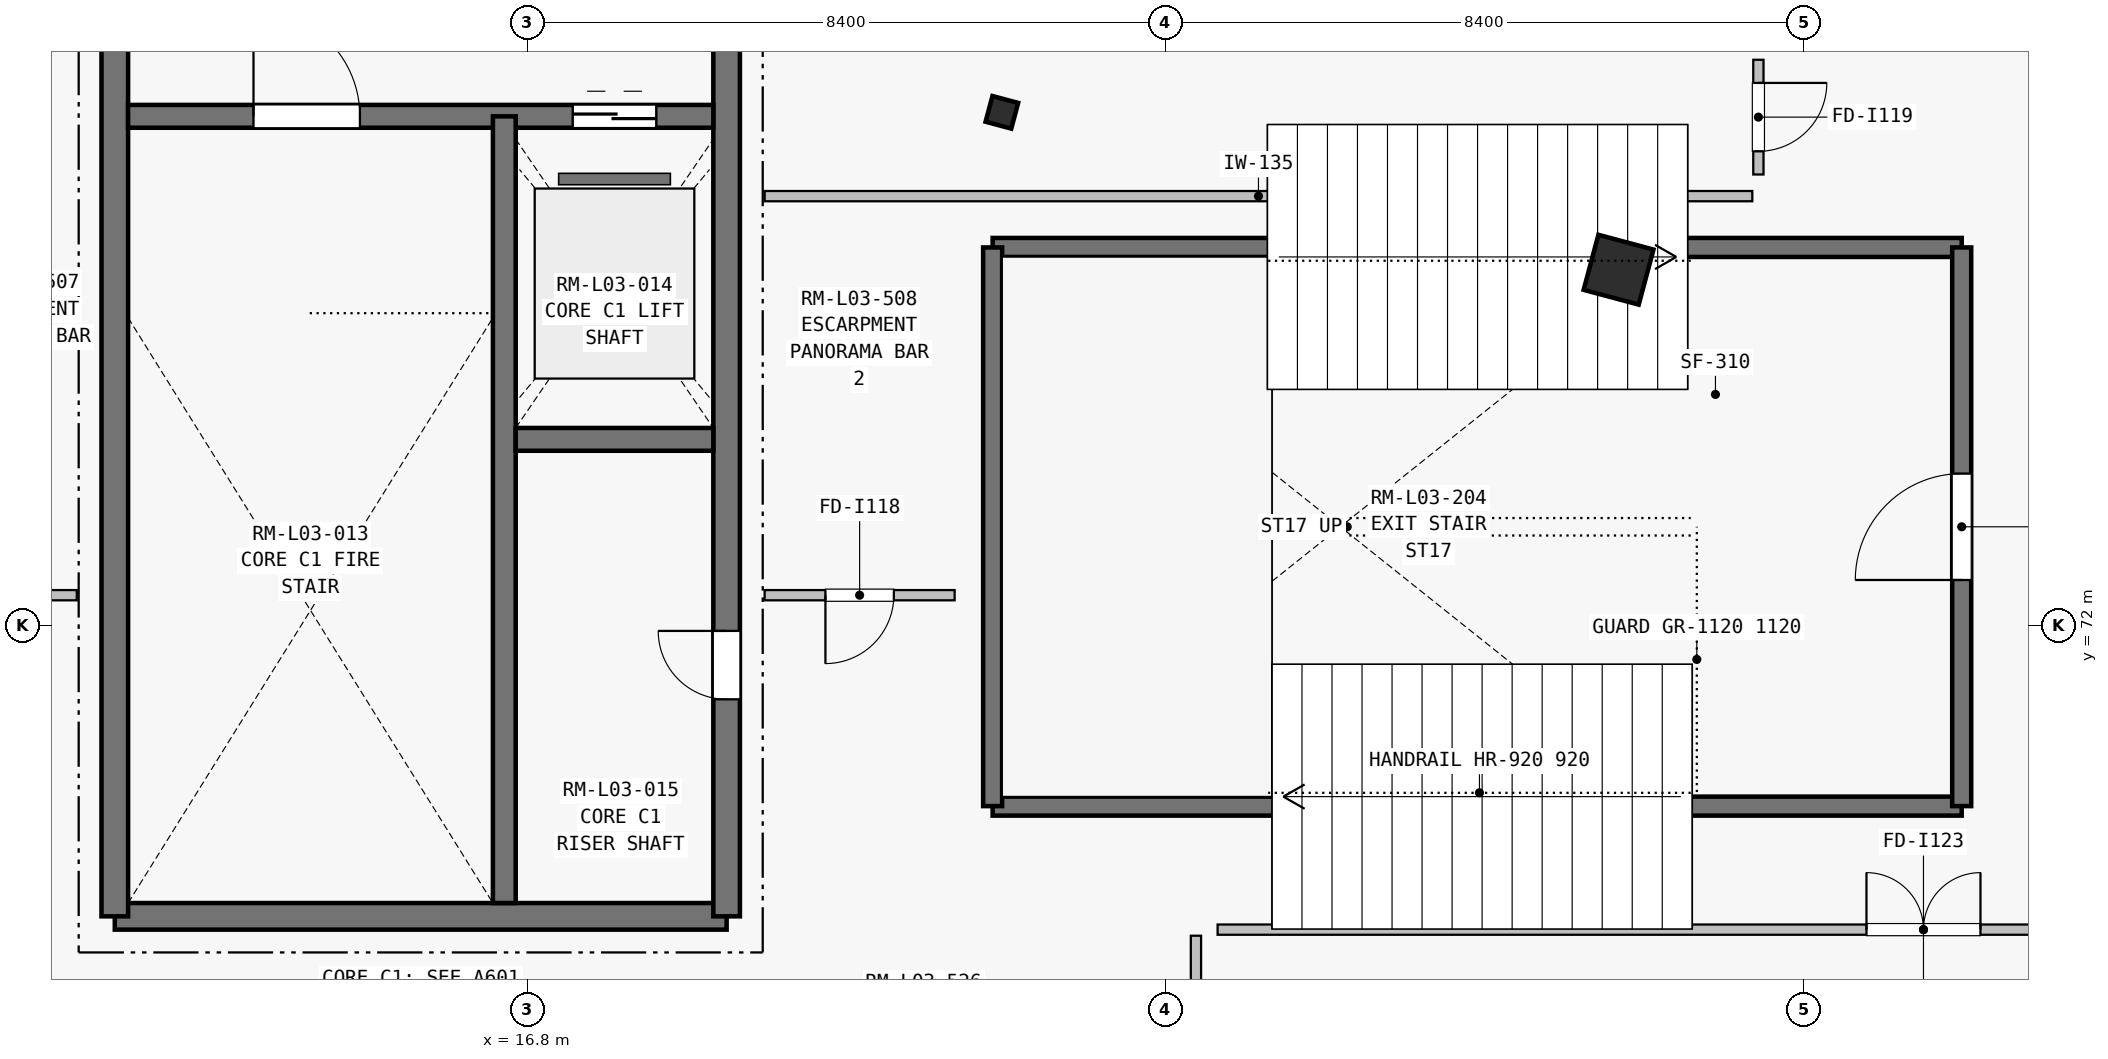
"""IFC4 building model, lengths in metres.
Left out: names, types, materials, properties, quantities, classifications, styles, units other than length and angle.
Written with IfcOpenShell. Run it as: python <this file> out.ifc"""

import sys

from ifc_helpers import new_model, si_unit, direction, frame, frame_2d, origin, origin_2d, place, context, subcontext, project, spatial, rectangle, i_section, extrude, element, fill, save


model = new_model("IFC4")
c1 = context("Model", 3, precision=1e-05, world=origin(), true_north=direction((0.0, 1.0)))
c2 = subcontext(c1, "Body", "Model", "MODEL_VIEW")
j1 = project(units=[si_unit("LENGTHUNIT", "METRE"), si_unit("PLANEANGLEUNIT", "RADIAN")], contexts=[c1])
p1 = place(None, origin())
s1 = spatial("IfcSite", under=j1, at=p1, CompositionType="ELEMENT")
p2 = place(p1, origin())
s2 = spatial("IfcBuilding", under=s1, at=p2, CompositionType="ELEMENT")
p3 = place(p2, frame((0.0, 0.0, 14.4)))
s3 = spatial("IfcBuildingStorey", under=s2, at=p3, CompositionType="ELEMENT", Elevation=14.4)
p4 = place(p3, frame((31.16, 76.682, 0.0), z_axis=(0.0, 0.0, 1.0), x_axis=(-0.965925826289, 0.258819045103, 0.0)))
e1 = element("IfcColumn", 1, at=p4, inside=s3, PredefinedType="COLUMN", context=c2, shape_type="SweptSolid", body=[
    extrude(rectangle(XDim=0.75, YDim=0.75, at=origin_2d()), origin(), (0.0, 0.0, 1.0), 4.5),
])
p5 = place(p3, frame((23.046, 78.753, 0.0), z_axis=(0.0, 0.0, 1.0), x_axis=(-0.965925826289, 0.258819045103, 0.0)))
e2 = element("IfcColumn", 2, at=p5, inside=s3, PredefinedType="COLUMN", context=c2, shape_type="SweptSolid", body=[
    extrude(i_section(OverallWidth=0.35, OverallDepth=0.35, WebThickness=0.014, FlangeThickness=0.024, at=origin_2d()), origin(), (0.0, 0.0, 1.0), 4.5),
])
p6 = place(p3, frame((11.375, 68.175, 0.0), z_axis=(0.0, 0.0, 1.0), x_axis=(1.0, 0.0, 0.0)))
e3 = element("IfcWall", 3, at=p6, inside=s3, PredefinedType="SHEAR", context=c2, shape_type="SweptSolid", body=[
    extrude(rectangle(XDim=8.05, YDim=0.35, at=frame_2d((4.025, 0.0))), origin(), (0.0, 0.0, 1.0), 4.5),
])
p7 = place(p3, frame((11.375, 68.175, 0.0), z_axis=(0.0, 0.0, 1.0), x_axis=(0.0, 1.0, 0.0)))
e4 = element("IfcWall", 4, at=p7, inside=s3, PredefinedType="SHEAR", context=c2, shape_type="SweptSolid", body=[
    extrude(rectangle(XDim=14.85, YDim=0.35, at=frame_2d((7.425, 0.0))), origin(), (0.0, 0.0, 1.0), 4.5),
])
p8 = place(p3, frame((19.425, 68.175, 0.0), z_axis=(0.0, 0.0, 1.0), x_axis=(0.0, 1.0, 0.0)))
e5 = element("IfcWall", 5, at=p8, inside=s3, PredefinedType="SHEAR", context=c2, shape_type="SweptSolid", body=[
    extrude(rectangle(XDim=14.85, YDim=0.35, at=frame_2d((7.425, 0.0))), origin(), (0.0, 0.0, 1.0), 4.5),
])
p9 = place(p8, frame((2.855, 0.0, 0.0)))
e6 = element("IfcOpeningElement", 6, at=p9, cuts=e5, PredefinedType="OPENING", context=c2, shape_type="SweptSolid", body=[
    extrude(rectangle(XDim=0.9, YDim=2.1, at=frame_2d((0.45, 1.05))), frame((0.0, 0.185, 0.0), z_axis=(0.0, -1.0, 0.0), x_axis=(1.0, 0.0, 0.0)), (0.0, 0.0, 1.0), 0.37),
])
p10 = place(p3, frame((11.55, 78.7, 0.0), z_axis=(0.0, 0.0, 1.0), x_axis=(1.0, 0.0, 0.0)))
e7 = element("IfcWall", 7, at=p10, inside=s3, PredefinedType="SHEAR", context=c2, shape_type="SweptSolid", body=[
    extrude(rectangle(XDim=7.7, YDim=0.3, at=frame_2d((3.85, 0.0))), origin(), (0.0, 0.0, 1.0), 4.5),
])
p11 = place(p10, frame((1.65, 0.0, 0.0)))
e8 = element("IfcOpeningElement", 8, at=p11, cuts=e7, PredefinedType="OPENING", context=c2, shape_type="SweptSolid", body=[
    extrude(rectangle(XDim=1.4, YDim=2.2, at=frame_2d((0.7, 1.1))), frame((0.0, 0.16, 0.0), z_axis=(0.0, -1.0, 0.0), x_axis=(1.0, 0.0, 0.0)), (0.0, 0.0, 1.0), 0.32),
])
p12 = place(p10, frame((5.85, 0.0, 0.0)))
e9 = element("IfcOpeningElement", 9, at=p12, cuts=e7, PredefinedType="OPENING", context=c2, shape_type="SweptSolid", body=[
    extrude(rectangle(XDim=1.1, YDim=2.2, at=frame_2d((0.55, 1.1))), frame((0.0, 0.16, 0.0), z_axis=(0.0, -1.0, 0.0), x_axis=(1.0, 0.0, 0.0)), (0.0, 0.0, 1.0), 0.32),
])
p13 = place(p3, frame((16.5, 68.35, 0.0), z_axis=(0.0, 0.0, 1.0), x_axis=(0.0, 1.0, 0.0)))
e10 = element("IfcWall", 10, at=p13, inside=s3, PredefinedType="SHEAR", context=c2, shape_type="SweptSolid", body=[
    extrude(rectangle(XDim=10.35, YDim=0.3, at=frame_2d((5.175, 0.0))), origin(), (0.0, 0.0, 1.0), 4.5),
])
p14 = place(p3, frame((16.65, 74.45, 0.0), z_axis=(0.0, 0.0, 1.0), x_axis=(1.0, 0.0, 0.0)))
e11 = element("IfcWall", 11, at=p14, inside=s3, PredefinedType="SHEAR", context=c2, shape_type="SweptSolid", body=[
    extrude(rectangle(XDim=2.6, YDim=0.3, at=frame_2d((1.3, 0.0))), origin(), (0.0, 0.0, 1.0), 4.5),
])
for number, where, z_axis, x_axis in (
    (12, (22.925, 69.625, 0.0), (0.0, 0.0, 1.0), (1.0, 0.0, 0.0)),
    (13, (22.925, 76.975, 0.0), (0.0, 0.0, 1.0), (1.0, 0.0, 0.0)),
):
    element("IfcWall", number, at=place(p3, frame(where, z_axis=z_axis, x_axis=x_axis)), inside=s3, PredefinedType="SHEAR", context=c2, shape_type="SweptSolid", body=[
        extrude(rectangle(XDim=12.75, YDim=0.25, at=frame_2d((6.375, 0.0))), origin(), (0.0, 0.0, 1.0), 4.5),
    ])
p15 = place(p3, frame((22.925, 69.625, 0.0), z_axis=(0.0, 0.0, 1.0), x_axis=(0.0, 1.0, 0.0)))
e14 = element("IfcWall", 14, at=p15, inside=s3, PredefinedType="SHEAR", context=c2, shape_type="SweptSolid", body=[
    extrude(rectangle(XDim=7.35, YDim=0.25, at=frame_2d((3.675, 0.0))), origin(), (0.0, 0.0, 1.0), 4.5),
])
p16 = place(p3, frame((35.675, 69.625, 0.0), z_axis=(0.0, 0.0, 1.0), x_axis=(0.0, 1.0, 0.0)))
e15 = element("IfcWall", 15, at=p16, inside=s3, PredefinedType="SHEAR", context=c2, shape_type="SweptSolid", body=[
    extrude(rectangle(XDim=7.35, YDim=0.25, at=frame_2d((3.675, 0.0))), origin(), (0.0, 0.0, 1.0), 4.5),
])
p17 = place(p16, frame((2.975, 0.0, 0.0)))
e16 = element("IfcOpeningElement", 16, at=p17, cuts=e15, PredefinedType="OPENING", context=c2, shape_type="SweptSolid", body=[
    extrude(rectangle(XDim=1.4, YDim=2.2, at=frame_2d((0.7, 1.1))), frame((0.0, 0.135, 0.0), z_axis=(0.0, -1.0, 0.0), x_axis=(1.0, 0.0, 0.0)), (0.0, 0.0, 1.0), 0.27),
])
p18 = place(p3, frame((10.875, 72.4, 0.0), z_axis=(0.0, 0.0, 1.0), x_axis=(-1.0, 0.0, 0.0)))
e17 = element("IfcWall", 17, at=p18, inside=s3, PredefinedType="PARTITIONING", context=c2, shape_type="SweptSolid", body=[
    extrude(rectangle(XDim=1.8, YDim=0.135, at=frame_2d((0.9, 0.0))), origin(), (0.0, 0.0, 1.0), 4.26),
])
p19 = place(p18, frame((0.45, 0.0, 0.0)))
e18 = element("IfcOpeningElement", 18, at=p19, cuts=e17, PredefinedType="OPENING", context=c2, shape_type="SweptSolid", body=[
    extrude(rectangle(XDim=0.9, YDim=2.1, at=frame_2d((0.45, 1.05))), frame((0.0, 0.077, 0.0), z_axis=(0.0, -1.0, 0.0), x_axis=(1.0, 0.0, 0.0)), (0.0, 0.0, 1.0), 0.155),
])
p20 = place(p3, frame((22.425, 72.4, 0.0), z_axis=(0.0, 0.0, 1.0), x_axis=(-1.0, 0.0, 0.0)))
e19 = element("IfcWall", 19, at=p20, inside=s3, PredefinedType="PARTITIONING", context=c2, shape_type="SweptSolid", body=[
    extrude(rectangle(XDim=2.5, YDim=0.135, at=frame_2d((1.25, 0.0))), origin(), (0.0, 0.0, 1.0), 3.553),
])
p21 = place(p20, frame((0.8, 0.0, 0.0)))
e20 = element("IfcOpeningElement", 20, at=p21, cuts=e19, PredefinedType="OPENING", context=c2, shape_type="SweptSolid", body=[
    extrude(rectangle(XDim=0.9, YDim=2.1, at=frame_2d((0.45, 1.05))), frame((0.0, 0.077, 0.0), z_axis=(0.0, -1.0, 0.0), x_axis=(1.0, 0.0, 0.0)), (0.0, 0.0, 1.0), 0.155),
])
p22 = place(p3, frame((19.925, 77.65, 0.0), z_axis=(0.0, 0.0, 1.0), x_axis=(1.0, 0.0, 0.0)))
e21 = element("IfcWall", 21, at=p22, inside=s3, PredefinedType="PARTITIONING", context=c2, shape_type="SweptSolid", body=[
    extrude(rectangle(XDim=12.995, YDim=0.135, at=frame_2d((6.498, 0.0))), origin(), (0.0, 0.0, 1.0), 3.553),
])
p23 = place(p3, frame((33.0, 79.444, 0.0), z_axis=(0.0, 0.0, 1.0), x_axis=(0.0, -1.0, 0.0)))
e22 = element("IfcWall", 22, at=p23, inside=s3, PredefinedType="PARTITIONING", context=c2, shape_type="SweptSolid", body=[
    extrude(rectangle(XDim=1.509, YDim=0.135, at=frame_2d((0.755, 0.0))), origin(), (0.0, 0.0, 1.0), 4.19),
])
p24 = place(p23, frame((0.305, 0.0, 0.0)))
e23 = element("IfcOpeningElement", 23, at=p24, cuts=e22, PredefinedType="OPENING", context=c2, shape_type="SweptSolid", body=[
    extrude(rectangle(XDim=0.9, YDim=2.1, at=frame_2d((0.45, 1.05))), frame((0.0, 0.077, 0.0), z_axis=(0.0, -1.0, 0.0), x_axis=(1.0, 0.0, 0.0)), (0.0, 0.0, 1.0), 0.155),
])
p25 = place(p3, frame((25.6, 58.875, 0.0), z_axis=(0.0, 0.0, 1.0), x_axis=(0.0, 1.0, 0.0)))
e24 = element("IfcWall", 24, at=p25, inside=s3, PredefinedType="PARTITIONING", context=c2, shape_type="SweptSolid", body=[
    extrude(rectangle(XDim=9.045, YDim=0.135, at=frame_2d((4.522, 0.0))), origin(), (0.0, 0.0, 1.0), 3.705),
])
p26 = place(p3, frame((25.885, 68.0, 0.0), z_axis=(0.0, 0.0, 1.0), x_axis=(1.0, 0.0, 0.0)))
e25 = element("IfcWall", 25, at=p26, inside=s3, PredefinedType="PARTITIONING", context=c2, shape_type="SweptSolid", body=[
    extrude(rectangle(XDim=18.574, YDim=0.135, at=frame_2d((9.287, 0.0))), origin(), (0.0, 0.0, 1.0), 2.943),
])
p27 = place(p26, frame((8.537, 0.0, 0.0)))
e26 = element("IfcOpeningElement", 26, at=p27, cuts=e25, PredefinedType="OPENING", context=c2, shape_type="SweptSolid", body=[
    extrude(rectangle(XDim=1.5, YDim=2.2, at=frame_2d((0.75, 1.1))), frame((0.0, 0.077, 0.0), z_axis=(0.0, -1.0, 0.0), x_axis=(1.0, 0.0, 0.0)), (0.0, 0.0, 1.0), 0.155),
])
p28 = place(p11, origin())
e27 = element("IfcDoor", 27, at=p28, inside=s3, OperationType="SINGLE_SWING_LEFT", PredefinedType="DOOR", context=c2, shape_type="SweptSolid", body=[
    extrude(rectangle(XDim=1.4, YDim=2.2, at=frame_2d((0.7, 1.1))), frame((0.0, 0.025, 0.0), z_axis=(0.0, -1.0, 0.0), x_axis=(1.0, 0.0, 0.0)), (0.0, 0.0, 1.0), 0.05),
])
fill(e8, e27)
p29 = place(p9, origin())
e28 = element("IfcDoor", 28, at=p29, inside=s3, OperationType="SINGLE_SWING_RIGHT", PredefinedType="DOOR", context=c2, shape_type="SweptSolid", body=[
    extrude(rectangle(XDim=0.9, YDim=2.1, at=frame_2d((0.45, 1.05))), frame((0.0, 0.025, 0.0), z_axis=(0.0, -1.0, 0.0), x_axis=(1.0, 0.0, 0.0)), (0.0, 0.0, 1.0), 0.05),
])
fill(e6, e28)
p30 = place(p12, origin())
e29 = element("IfcDoor", 29, at=p30, inside=s3, OperationType="SLIDING_TO_LEFT", PredefinedType="DOOR", context=c2, shape_type="SweptSolid", body=[
    extrude(rectangle(XDim=1.1, YDim=2.2, at=frame_2d((0.55, 1.1))), frame((0.0, 0.025, 0.0), z_axis=(0.0, -1.0, 0.0), x_axis=(1.0, 0.0, 0.0)), (0.0, 0.0, 1.0), 0.05),
])
fill(e9, e29)
p31 = place(p17, origin())
e30 = element("IfcDoor", 30, at=p31, inside=s3, OperationType="SINGLE_SWING_LEFT", PredefinedType="DOOR", context=c2, shape_type="SweptSolid", body=[
    extrude(rectangle(XDim=1.4, YDim=2.2, at=frame_2d((0.7, 1.1))), frame((0.0, 0.025, 0.0), z_axis=(0.0, -1.0, 0.0), x_axis=(1.0, 0.0, 0.0)), (0.0, 0.0, 1.0), 0.05),
])
fill(e16, e30)
p32 = place(p21, origin())
e31 = element("IfcDoor", 31, at=p32, inside=s3, OperationType="SINGLE_SWING_RIGHT", PredefinedType="DOOR", context=c2, shape_type="SweptSolid", body=[
    extrude(rectangle(XDim=0.9, YDim=2.1, at=frame_2d((0.45, 1.05))), frame((0.0, 0.025, 0.0), z_axis=(0.0, -1.0, 0.0), x_axis=(1.0, 0.0, 0.0)), (0.0, 0.0, 1.0), 0.05),
])
fill(e20, e31)
p33 = place(p24, origin())
e32 = element("IfcDoor", 32, at=p33, inside=s3, OperationType="SINGLE_SWING_LEFT", PredefinedType="DOOR", context=c2, shape_type="SweptSolid", body=[
    extrude(rectangle(XDim=0.9, YDim=2.1, at=frame_2d((0.45, 1.05))), frame((0.0, 0.025, 0.0), z_axis=(0.0, -1.0, 0.0), x_axis=(1.0, 0.0, 0.0)), (0.0, 0.0, 1.0), 0.05),
])
fill(e23, e32)
p34 = place(p27, origin())
e33 = element("IfcDoor", 33, at=p34, inside=s3, OperationType="DOUBLE_DOOR_SINGLE_SWING", PredefinedType="DOOR", context=c2, shape_type="SweptSolid", body=[
    extrude(rectangle(XDim=1.5, YDim=2.2, at=frame_2d((0.75, 1.1))), frame((0.0, 0.025, 0.0), z_axis=(0.0, -1.0, 0.0), x_axis=(1.0, 0.0, 0.0)), (0.0, 0.0, 1.0), 0.05),
])
fill(e26, e33)
save(model, sys.argv[1])
